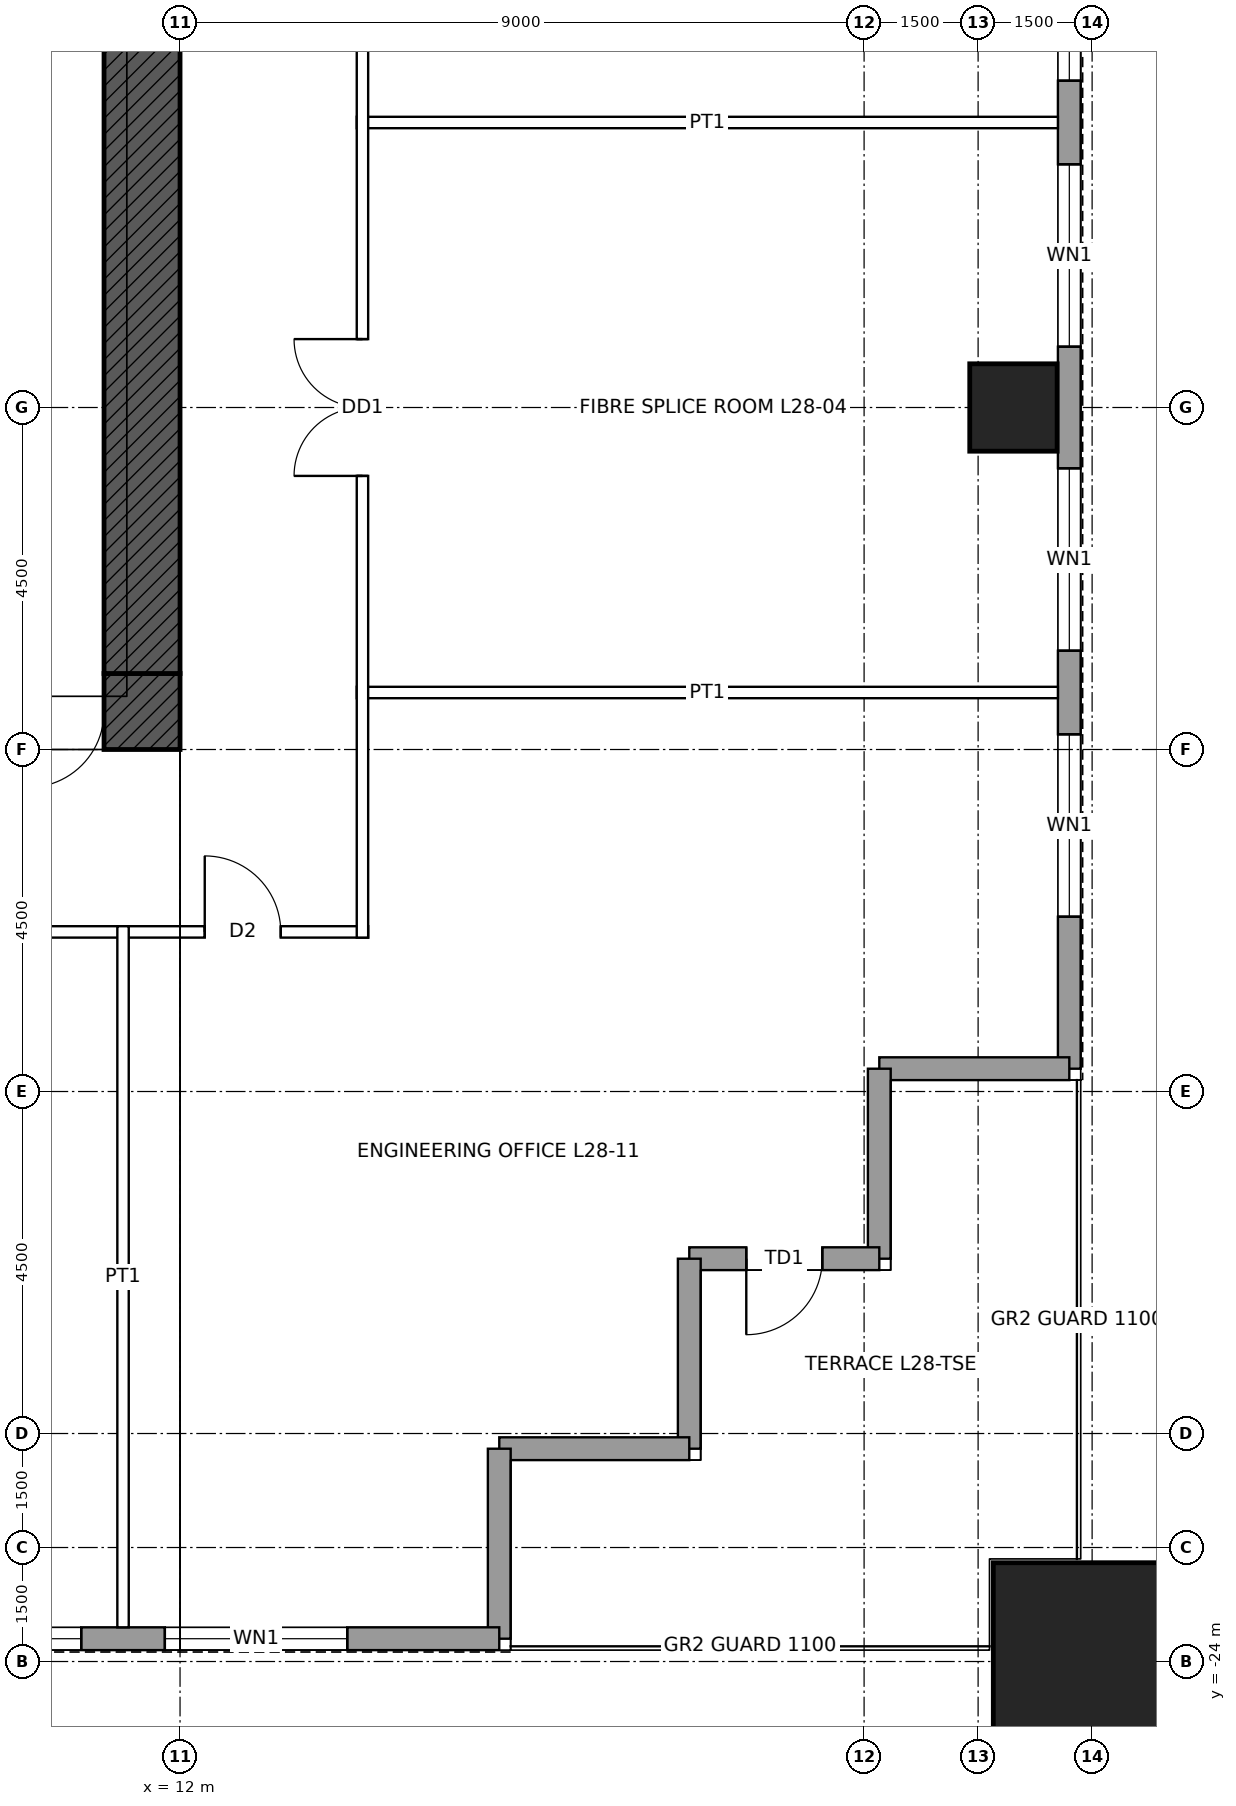
"""IFC4 building model, lengths in metres.
Left out: names, types, materials, properties, quantities, classifications, styles, units other than length and angle.
Written with IfcOpenShell. Run it as: python <this file> out.ifc"""

import sys

from ifc_helpers import new_model, si_unit, direction, frame, frame_2d, origin, origin_2d, place, context, subcontext, project, spatial, rectangle, hollow_rectangle, extrude, element, fill, save


model = new_model("IFC4")
c1 = context("Model", 3, precision=1e-05, world=origin(), true_north=direction((0.0, 1.0)))
c2 = subcontext(c1, "Body", "Model", "MODEL_VIEW")
j1 = project(units=[si_unit("LENGTHUNIT", "METRE"), si_unit("PLANEANGLEUNIT", "RADIAN")], contexts=[c1])
p1 = place(None, origin())
s1 = spatial("IfcSite", under=j1, at=p1, CompositionType="ELEMENT")
p2 = place(p1, origin())
s2 = spatial("IfcBuilding", under=s1, at=p2, CompositionType="ELEMENT")
p3 = place(p2, frame((0.0, 0.0, 140.4)))
s3 = spatial("IfcBuildingStorey", under=s2, at=p3, CompositionType="ELEMENT", Elevation=140.4)
p4 = place(p3, frame((24.0, -24.0, 0.0), z_axis=(0.0, 0.0, 1.0), x_axis=(1.0, 0.0, 0.0)))
e1 = element("IfcColumn", 1, at=p4, inside=s3, PredefinedType="COLUMN", context=c2, shape_type="SweptSolid", body=[
    extrude(hollow_rectangle(XDim=2.6, YDim=2.6, WallThickness=0.13, at=origin_2d()), origin(), (0.0, 0.0, 1.0), 4.5),
])
p5 = place(p3, frame((22.965, -7.5, 0.0), z_axis=(0.0, 0.0, 1.0), x_axis=(1.0, 0.0, 0.0)))
e2 = element("IfcColumn", 2, at=p5, inside=s3, PredefinedType="COLUMN", context=c2, shape_type="SweptSolid", body=[
    extrude(hollow_rectangle(XDim=1.15, YDim=1.15, WallThickness=0.075, at=origin_2d()), origin(), (0.0, 0.0, 1.0), 4.5),
])
p6 = place(p3, frame((12.0, -11.5, 0.0), z_axis=(0.0, 0.0, 1.0), x_axis=(-1.0, 0.0, 0.0)))
e3 = element("IfcWall", 3, at=p6, inside=s3, PredefinedType="SHEAR", context=c2, shape_type="SweptSolid", body=[
    extrude(rectangle(XDim=24.0, YDim=1.0, at=frame_2d((12.0, 0.0))), origin(), (0.0, 0.0, 1.0), 4.5),
])
p7 = place(p6, frame((11.5, 0.0, 0.0)))
e4 = element("IfcOpeningElement", 4, at=p7, cuts=e3, PredefinedType="OPENING", context=c2, shape_type="SweptSolid", body=[
    extrude(rectangle(XDim=1.0, YDim=2.1, at=frame_2d((0.5, 1.05))), frame((0.0, 0.51, 0.0), z_axis=(0.0, -1.0, 0.0), x_axis=(1.0, 0.0, 0.0)), (0.0, 0.0, 1.0), 1.02),
])
p8 = place(p6, frame((1.0, 0.0, 0.0)))
e5 = element("IfcOpeningElement", 5, at=p8, cuts=e3, PredefinedType="OPENING", context=c2, shape_type="SweptSolid", body=[
    extrude(rectangle(XDim=1.0, YDim=2.4, at=frame_2d((0.5, 1.2))), frame((0.0, 0.51, 0.0), z_axis=(0.0, -1.0, 0.0), x_axis=(1.0, 0.0, 0.0)), (0.0, 0.0, 1.0), 1.02),
])
p9 = place(p3, frame((11.5, 11.0, 0.0), z_axis=(0.0, 0.0, 1.0), x_axis=(0.0, -1.0, 0.0)))
e6 = element("IfcWall", 6, at=p9, inside=s3, PredefinedType="SHEAR", context=c2, shape_type="SweptSolid", body=[
    extrude(rectangle(XDim=22.0, YDim=1.0, at=frame_2d((11.0, 0.0))), origin(), (0.0, 0.0, 1.0), 4.5),
])
p10 = place(p9, frame((10.5, 0.0, 0.0)))
e7 = element("IfcOpeningElement", 7, at=p10, cuts=e6, PredefinedType="OPENING", context=c2, shape_type="SweptSolid", body=[
    extrude(rectangle(XDim=1.0, YDim=2.4, at=frame_2d((0.5, 1.2))), frame((0.0, 0.51, 0.0), z_axis=(0.0, -1.0, 0.0), x_axis=(1.0, 0.0, 0.0)), (0.0, 0.0, 1.0), 1.02),
])
p11 = place(p3, frame((23.7, 16.2, 0.0), z_axis=(0.0, 0.0, 1.0), x_axis=(0.0, -1.0, 0.0)))
e8 = element("IfcWall", 8, at=p11, inside=s3, PredefinedType="SOLIDWALL", context=c2, shape_type="SweptSolid", body=[
    extrude(rectangle(XDim=32.4, YDim=0.3, at=frame_2d((16.2, 0.0))), origin(), (0.0, 0.0, 1.0), 4.3),
])
p12 = place(p11, frame((2.0, 0.0, 1.0)))
e9 = element("IfcOpeningElement", 9, at=p12, cuts=e8, PredefinedType="OPENING", context=c2, shape_type="SweptSolid", body=[
    extrude(rectangle(XDim=2.4, YDim=1.2, at=frame_2d((1.2, 0.6))), frame((0.0, 0.16, 0.0), z_axis=(0.0, -1.0, 0.0), x_axis=(1.0, 0.0, 0.0)), (0.0, 0.0, 1.0), 0.32),
])
p13 = place(p11, frame((5.5, 0.0, 1.0)))
e10 = element("IfcOpeningElement", 10, at=p13, cuts=e8, PredefinedType="OPENING", context=c2, shape_type="SweptSolid", body=[
    extrude(rectangle(XDim=2.4, YDim=1.2, at=frame_2d((1.2, 0.6))), frame((0.0, 0.16, 0.0), z_axis=(0.0, -1.0, 0.0), x_axis=(1.0, 0.0, 0.0)), (0.0, 0.0, 1.0), 0.32),
])
p14 = place(p11, frame((9.5, 0.0, 1.0)))
e11 = element("IfcOpeningElement", 11, at=p14, cuts=e8, PredefinedType="OPENING", context=c2, shape_type="SweptSolid", body=[
    extrude(rectangle(XDim=2.4, YDim=1.2, at=frame_2d((1.2, 0.6))), frame((0.0, 0.16, 0.0), z_axis=(0.0, -1.0, 0.0), x_axis=(1.0, 0.0, 0.0)), (0.0, 0.0, 1.0), 0.32),
])
p15 = place(p11, frame((13.0, 0.0, 1.0)))
e12 = element("IfcOpeningElement", 12, at=p15, cuts=e8, PredefinedType="OPENING", context=c2, shape_type="SweptSolid", body=[
    extrude(rectangle(XDim=2.4, YDim=1.2, at=frame_2d((1.2, 0.6))), frame((0.0, 0.16, 0.0), z_axis=(0.0, -1.0, 0.0), x_axis=(1.0, 0.0, 0.0)), (0.0, 0.0, 1.0), 0.32),
])
p16 = place(p11, frame((17.0, 0.0, 1.0)))
e13 = element("IfcOpeningElement", 13, at=p16, cuts=e8, PredefinedType="OPENING", context=c2, shape_type="SweptSolid", body=[
    extrude(rectangle(XDim=2.4, YDim=1.2, at=frame_2d((1.2, 0.6))), frame((0.0, 0.16, 0.0), z_axis=(0.0, -1.0, 0.0), x_axis=(1.0, 0.0, 0.0)), (0.0, 0.0, 1.0), 0.32),
])
p17 = place(p11, frame((20.5, 0.0, 1.0)))
e14 = element("IfcOpeningElement", 14, at=p17, cuts=e8, PredefinedType="OPENING", context=c2, shape_type="SweptSolid", body=[
    extrude(rectangle(XDim=2.4, YDim=1.2, at=frame_2d((1.2, 0.6))), frame((0.0, 0.16, 0.0), z_axis=(0.0, -1.0, 0.0), x_axis=(1.0, 0.0, 0.0)), (0.0, 0.0, 1.0), 0.32),
])
p18 = place(p11, frame((24.5, 0.0, 1.0)))
e15 = element("IfcOpeningElement", 15, at=p18, cuts=e8, PredefinedType="OPENING", context=c2, shape_type="SweptSolid", body=[
    extrude(rectangle(XDim=2.4, YDim=1.2, at=frame_2d((1.2, 0.6))), frame((0.0, 0.16, 0.0), z_axis=(0.0, -1.0, 0.0), x_axis=(1.0, 0.0, 0.0)), (0.0, 0.0, 1.0), 0.32),
])
p19 = place(p11, frame((28.0, 0.0, 1.0)))
e16 = element("IfcOpeningElement", 16, at=p19, cuts=e8, PredefinedType="OPENING", context=c2, shape_type="SweptSolid", body=[
    extrude(rectangle(XDim=2.4, YDim=1.2, at=frame_2d((1.2, 0.6))), frame((0.0, 0.16, 0.0), z_axis=(0.0, -1.0, 0.0), x_axis=(1.0, 0.0, 0.0)), (0.0, 0.0, 1.0), 0.32),
])
for number, where, z_axis, x_axis in (
    (17, (23.7, -16.2, 0.0), (0.0, 0.0, 1.0), (-1.0, 0.0, 0.0)),
    (18, (21.2, -16.2, 0.0), (0.0, 0.0, 1.0), (0.0, -1.0, 0.0)),
):
    element("IfcWall", number, at=place(p3, frame(where, z_axis=z_axis, x_axis=x_axis)), inside=s3, PredefinedType="SOLIDWALL", context=c2, shape_type="SweptSolid", body=[
        extrude(rectangle(XDim=2.5, YDim=0.3, at=frame_2d((1.25, 0.0))), origin(), (0.0, 0.0, 1.0), 4.3),
    ])
p20 = place(p3, frame((21.2, -18.7, 0.0), z_axis=(0.0, 0.0, 1.0), x_axis=(-1.0, 0.0, 0.0)))
e19 = element("IfcWall", 19, at=p20, inside=s3, PredefinedType="SOLIDWALL", context=c2, shape_type="SweptSolid", body=[
    extrude(rectangle(XDim=2.5, YDim=0.3, at=frame_2d((1.25, 0.0))), origin(), (0.0, 0.0, 1.0), 4.3),
])
p21 = place(p20, frame((0.75, 0.0, 0.0)))
e20 = element("IfcOpeningElement", 20, at=p21, cuts=e19, PredefinedType="OPENING", context=c2, shape_type="SweptSolid", body=[
    extrude(rectangle(XDim=1.0, YDim=2.4, at=frame_2d((0.5, 1.2))), frame((0.0, 0.16, 0.0), z_axis=(0.0, -1.0, 0.0), x_axis=(1.0, 0.0, 0.0)), (0.0, 0.0, 1.0), 0.32),
])
for number, where, z_axis, x_axis in (
    (21, (18.7, -18.7, 0.0), (0.0, 0.0, 1.0), (0.0, -1.0, 0.0)),
    (22, (18.7, -21.2, 0.0), (0.0, 0.0, 1.0), (-1.0, 0.0, 0.0)),
    (23, (16.2, -21.2, 0.0), (0.0, 0.0, 1.0), (0.0, -1.0, 0.0)),
):
    element("IfcWall", number, at=place(p3, frame(where, z_axis=z_axis, x_axis=x_axis)), inside=s3, PredefinedType="SOLIDWALL", context=c2, shape_type="SweptSolid", body=[
        extrude(rectangle(XDim=2.5, YDim=0.3, at=frame_2d((1.25, 0.0))), origin(), (0.0, 0.0, 1.0), 4.3),
    ])
p22 = place(p3, frame((16.2, -23.7, 0.0), z_axis=(0.0, 0.0, 1.0), x_axis=(-1.0, 0.0, 0.0)))
e24 = element("IfcWall", 24, at=p22, inside=s3, PredefinedType="SOLIDWALL", context=c2, shape_type="SweptSolid", body=[
    extrude(rectangle(XDim=32.4, YDim=0.3, at=frame_2d((16.2, 0.0))), origin(), (0.0, 0.0, 1.0), 4.3),
])
p23 = place(p22, frame((2.0, 0.0, 1.0)))
e25 = element("IfcOpeningElement", 25, at=p23, cuts=e24, PredefinedType="OPENING", context=c2, shape_type="SweptSolid", body=[
    extrude(rectangle(XDim=2.4, YDim=1.2, at=frame_2d((1.2, 0.6))), frame((0.0, 0.16, 0.0), z_axis=(0.0, -1.0, 0.0), x_axis=(1.0, 0.0, 0.0)), (0.0, 0.0, 1.0), 0.32),
])
p24 = place(p22, frame((5.5, 0.0, 1.0)))
e26 = element("IfcOpeningElement", 26, at=p24, cuts=e24, PredefinedType="OPENING", context=c2, shape_type="SweptSolid", body=[
    extrude(rectangle(XDim=2.4, YDim=1.2, at=frame_2d((1.2, 0.6))), frame((0.0, 0.16, 0.0), z_axis=(0.0, -1.0, 0.0), x_axis=(1.0, 0.0, 0.0)), (0.0, 0.0, 1.0), 0.32),
])
p25 = place(p22, frame((9.5, 0.0, 1.0)))
e27 = element("IfcOpeningElement", 27, at=p25, cuts=e24, PredefinedType="OPENING", context=c2, shape_type="SweptSolid", body=[
    extrude(rectangle(XDim=2.4, YDim=1.2, at=frame_2d((1.2, 0.6))), frame((0.0, 0.16, 0.0), z_axis=(0.0, -1.0, 0.0), x_axis=(1.0, 0.0, 0.0)), (0.0, 0.0, 1.0), 0.32),
])
p26 = place(p22, frame((13.0, 0.0, 1.0)))
e28 = element("IfcOpeningElement", 28, at=p26, cuts=e24, PredefinedType="OPENING", context=c2, shape_type="SweptSolid", body=[
    extrude(rectangle(XDim=2.4, YDim=1.2, at=frame_2d((1.2, 0.6))), frame((0.0, 0.16, 0.0), z_axis=(0.0, -1.0, 0.0), x_axis=(1.0, 0.0, 0.0)), (0.0, 0.0, 1.0), 0.32),
])
p27 = place(p22, frame((17.0, 0.0, 1.0)))
e29 = element("IfcOpeningElement", 29, at=p27, cuts=e24, PredefinedType="OPENING", context=c2, shape_type="SweptSolid", body=[
    extrude(rectangle(XDim=2.4, YDim=1.2, at=frame_2d((1.2, 0.6))), frame((0.0, 0.16, 0.0), z_axis=(0.0, -1.0, 0.0), x_axis=(1.0, 0.0, 0.0)), (0.0, 0.0, 1.0), 0.32),
])
p28 = place(p22, frame((20.5, 0.0, 1.0)))
e30 = element("IfcOpeningElement", 30, at=p28, cuts=e24, PredefinedType="OPENING", context=c2, shape_type="SweptSolid", body=[
    extrude(rectangle(XDim=2.4, YDim=1.2, at=frame_2d((1.2, 0.6))), frame((0.0, 0.16, 0.0), z_axis=(0.0, -1.0, 0.0), x_axis=(1.0, 0.0, 0.0)), (0.0, 0.0, 1.0), 0.32),
])
p29 = place(p22, frame((24.5, 0.0, 1.0)))
e31 = element("IfcOpeningElement", 31, at=p29, cuts=e24, PredefinedType="OPENING", context=c2, shape_type="SweptSolid", body=[
    extrude(rectangle(XDim=2.4, YDim=1.2, at=frame_2d((1.2, 0.6))), frame((0.0, 0.16, 0.0), z_axis=(0.0, -1.0, 0.0), x_axis=(1.0, 0.0, 0.0)), (0.0, 0.0, 1.0), 0.32),
])
p30 = place(p22, frame((28.0, 0.0, 1.0)))
e32 = element("IfcOpeningElement", 32, at=p30, cuts=e24, PredefinedType="OPENING", context=c2, shape_type="SweptSolid", body=[
    extrude(rectangle(XDim=2.4, YDim=1.2, at=frame_2d((1.2, 0.6))), frame((0.0, 0.16, 0.0), z_axis=(0.0, -1.0, 0.0), x_axis=(1.0, 0.0, 0.0)), (0.0, 0.0, 1.0), 0.32),
])
p31 = place(p3, frame((-14.475, -14.4, 0.0), z_axis=(0.0, 0.0, 1.0), x_axis=(1.0, 0.0, 0.0)))
e33 = element("IfcWall", 33, at=p31, inside=s3, PredefinedType="PARTITIONING", context=c2, shape_type="SweptSolid", body=[
    extrude(rectangle(XDim=28.95, YDim=0.15, at=frame_2d((14.475, 0.0))), origin(), (0.0, 0.0, 1.0), 4.3),
])
p32 = place(p31, frame((21.075, 0.0, 0.0)))
e34 = element("IfcOpeningElement", 34, at=p32, cuts=e33, PredefinedType="OPENING", context=c2, shape_type="SweptSolid", body=[
    extrude(rectangle(XDim=1.8, YDim=2.4, at=frame_2d((0.9, 1.2))), frame((0.0, 0.085, 0.0), z_axis=(0.0, -1.0, 0.0), x_axis=(1.0, 0.0, 0.0)), (0.0, 0.0, 1.0), 0.17),
])
p33 = place(p31, frame((9.825, 0.0, 0.0)))
e35 = element("IfcOpeningElement", 35, at=p33, cuts=e33, PredefinedType="OPENING", context=c2, shape_type="SweptSolid", body=[
    extrude(rectangle(XDim=1.8, YDim=2.4, at=frame_2d((0.9, 1.2))), frame((0.0, 0.085, 0.0), z_axis=(0.0, -1.0, 0.0), x_axis=(1.0, 0.0, 0.0)), (0.0, 0.0, 1.0), 0.17),
])
p34 = place(p31, frame((26.8, 0.0, 0.0)))
e36 = element("IfcOpeningElement", 36, at=p34, cuts=e33, PredefinedType="OPENING", context=c2, shape_type="SweptSolid", body=[
    extrude(rectangle(XDim=1.0, YDim=2.1, at=frame_2d((0.5, 1.05))), frame((0.0, 0.085, 0.0), z_axis=(0.0, -1.0, 0.0), x_axis=(1.0, 0.0, 0.0)), (0.0, 0.0, 1.0), 0.17),
])
p35 = place(p31, frame((1.15, 0.0, 0.0)))
e37 = element("IfcOpeningElement", 37, at=p35, cuts=e33, PredefinedType="OPENING", context=c2, shape_type="SweptSolid", body=[
    extrude(rectangle(XDim=1.0, YDim=2.1, at=frame_2d((0.5, 1.05))), frame((0.0, 0.085, 0.0), z_axis=(0.0, -1.0, 0.0), x_axis=(1.0, 0.0, 0.0)), (0.0, 0.0, 1.0), 0.17),
])
for number, where, z_axis, x_axis in (
    (38, (14.325, -11.25, 0.0), (0.0, 0.0, 1.0), (1.0, 0.0, 0.0)),
    (39, (14.325, -3.75, 0.0), (0.0, 0.0, 1.0), (1.0, 0.0, 0.0)),
    (40, (11.25, -23.55, 0.0), (0.0, 0.0, 1.0), (0.0, 1.0, 0.0)),
):
    element("IfcWall", number, at=place(p3, frame(where, z_axis=z_axis, x_axis=x_axis)), inside=s3, PredefinedType="PARTITIONING", context=c2, shape_type="SweptSolid", body=[
        extrude(rectangle(XDim=9.225, YDim=0.15, at=frame_2d((4.613, 0.0))), origin(), (0.0, 0.0, 1.0), 3.431),
    ])
p36 = place(p3, frame((14.4, -14.475, 0.0), z_axis=(0.0, 0.0, 1.0), x_axis=(0.0, 1.0, 0.0)))
e41 = element("IfcWall", 41, at=p36, inside=s3, PredefinedType="PARTITIONING", context=c2, shape_type="SweptSolid", body=[
    extrude(rectangle(XDim=28.95, YDim=0.15, at=frame_2d((14.475, 0.0))), origin(), (0.0, 0.0, 1.0), 4.3),
])
p37 = place(p36, frame((17.325, 0.0, 0.0)))
e42 = element("IfcOpeningElement", 42, at=p37, cuts=e41, PredefinedType="OPENING", context=c2, shape_type="SweptSolid", body=[
    extrude(rectangle(XDim=1.8, YDim=2.4, at=frame_2d((0.9, 1.2))), frame((0.0, 0.085, 0.0), z_axis=(0.0, -1.0, 0.0), x_axis=(1.0, 0.0, 0.0)), (0.0, 0.0, 1.0), 0.17),
])
p38 = place(p36, frame((6.075, 0.0, 0.0)))
e43 = element("IfcOpeningElement", 43, at=p38, cuts=e41, PredefinedType="OPENING", context=c2, shape_type="SweptSolid", body=[
    extrude(rectangle(XDim=1.8, YDim=2.4, at=frame_2d((0.9, 1.2))), frame((0.0, 0.085, 0.0), z_axis=(0.0, -1.0, 0.0), x_axis=(1.0, 0.0, 0.0)), (0.0, 0.0, 1.0), 0.17),
])
p39 = place(p16, origin())
e44 = element("IfcWindow", 44, at=p39, inside=s3, PartitioningType="SINGLE_PANEL", PredefinedType="WINDOW", context=c2, shape_type="SweptSolid", body=[
    extrude(rectangle(XDim=2.4, YDim=1.2, at=frame_2d((1.2, 0.6))), frame((0.0, 0.03, 0.0), z_axis=(0.0, -1.0, 0.0), x_axis=(1.0, 0.0, 0.0)), (0.0, 0.0, 1.0), 0.06),
])
fill(e13, e44)
p40 = place(p17, origin())
e45 = element("IfcWindow", 45, at=p40, inside=s3, PartitioningType="SINGLE_PANEL", PredefinedType="WINDOW", context=c2, shape_type="SweptSolid", body=[
    extrude(rectangle(XDim=2.4, YDim=1.2, at=frame_2d((1.2, 0.6))), frame((0.0, 0.03, 0.0), z_axis=(0.0, -1.0, 0.0), x_axis=(1.0, 0.0, 0.0)), (0.0, 0.0, 1.0), 0.06),
])
fill(e14, e45)
p41 = place(p18, origin())
e46 = element("IfcWindow", 46, at=p41, inside=s3, PartitioningType="SINGLE_PANEL", PredefinedType="WINDOW", context=c2, shape_type="SweptSolid", body=[
    extrude(rectangle(XDim=2.4, YDim=1.2, at=frame_2d((1.2, 0.6))), frame((0.0, 0.03, 0.0), z_axis=(0.0, -1.0, 0.0), x_axis=(1.0, 0.0, 0.0)), (0.0, 0.0, 1.0), 0.06),
])
fill(e15, e46)
p42 = place(p19, origin())
e47 = element("IfcWindow", 47, at=p42, inside=s3, PartitioningType="SINGLE_PANEL", PredefinedType="WINDOW", context=c2, shape_type="SweptSolid", body=[
    extrude(rectangle(XDim=2.4, YDim=1.2, at=frame_2d((1.2, 0.6))), frame((0.0, 0.03, 0.0), z_axis=(0.0, -1.0, 0.0), x_axis=(1.0, 0.0, 0.0)), (0.0, 0.0, 1.0), 0.06),
])
fill(e16, e47)
p43 = place(p21, origin())
e48 = element("IfcDoor", 48, at=p43, inside=s3, OperationType="SINGLE_SWING_RIGHT", PredefinedType="DOOR", context=c2, shape_type="SweptSolid", body=[
    extrude(rectangle(XDim=1.0, YDim=2.4, at=frame_2d((0.5, 1.2))), frame((0.0, 0.025, 0.0), z_axis=(0.0, -1.0, 0.0), x_axis=(1.0, 0.0, 0.0)), (0.0, 0.0, 1.0), 0.05),
])
fill(e20, e48)
p44 = place(p23, origin())
e49 = element("IfcWindow", 49, at=p44, inside=s3, PartitioningType="SINGLE_PANEL", PredefinedType="WINDOW", context=c2, shape_type="SweptSolid", body=[
    extrude(rectangle(XDim=2.4, YDim=1.2, at=frame_2d((1.2, 0.6))), frame((0.0, 0.03, 0.0), z_axis=(0.0, -1.0, 0.0), x_axis=(1.0, 0.0, 0.0)), (0.0, 0.0, 1.0), 0.06),
])
fill(e25, e49)
p45 = place(p24, origin())
e50 = element("IfcWindow", 50, at=p45, inside=s3, PartitioningType="SINGLE_PANEL", PredefinedType="WINDOW", context=c2, shape_type="SweptSolid", body=[
    extrude(rectangle(XDim=2.4, YDim=1.2, at=frame_2d((1.2, 0.6))), frame((0.0, 0.03, 0.0), z_axis=(0.0, -1.0, 0.0), x_axis=(1.0, 0.0, 0.0)), (0.0, 0.0, 1.0), 0.06),
])
fill(e26, e50)
p46 = place(p8, origin())
e51 = element("IfcDoor", 51, at=p46, inside=s3, OperationType="SINGLE_SWING_RIGHT", PredefinedType="DOOR", context=c2, shape_type="SweptSolid", body=[
    extrude(rectangle(XDim=1.0, YDim=2.4, at=frame_2d((0.5, 1.2))), frame((0.0, 0.485, 0.0), z_axis=(0.0, -1.0, 0.0), x_axis=(1.0, 0.0, 0.0)), (0.0, 0.0, 1.0), 0.05),
])
fill(e5, e51)
p47 = place(p38, origin())
e52 = element("IfcDoor", 52, at=p47, inside=s3, OperationType="DOUBLE_DOOR_SINGLE_SWING", PredefinedType="DOOR", context=c2, shape_type="SweptSolid", body=[
    extrude(rectangle(XDim=1.8, YDim=2.4, at=frame_2d((0.9, 1.2))), frame((0.0, 0.025, 0.0), z_axis=(0.0, -1.0, 0.0), x_axis=(1.0, 0.0, 0.0)), (0.0, 0.0, 1.0), 0.05),
])
fill(e43, e52)
p48 = place(p34, origin())
e53 = element("IfcDoor", 53, at=p48, inside=s3, OperationType="SINGLE_SWING_LEFT", PredefinedType="DOOR", context=c2, shape_type="SweptSolid", body=[
    extrude(rectangle(XDim=1.0, YDim=2.1, at=frame_2d((0.5, 1.05))), frame((0.0, 0.025, 0.0), z_axis=(0.0, -1.0, 0.0), x_axis=(1.0, 0.0, 0.0)), (0.0, 0.0, 1.0), 0.05),
])
fill(e36, e53)
save(model, sys.argv[1])
